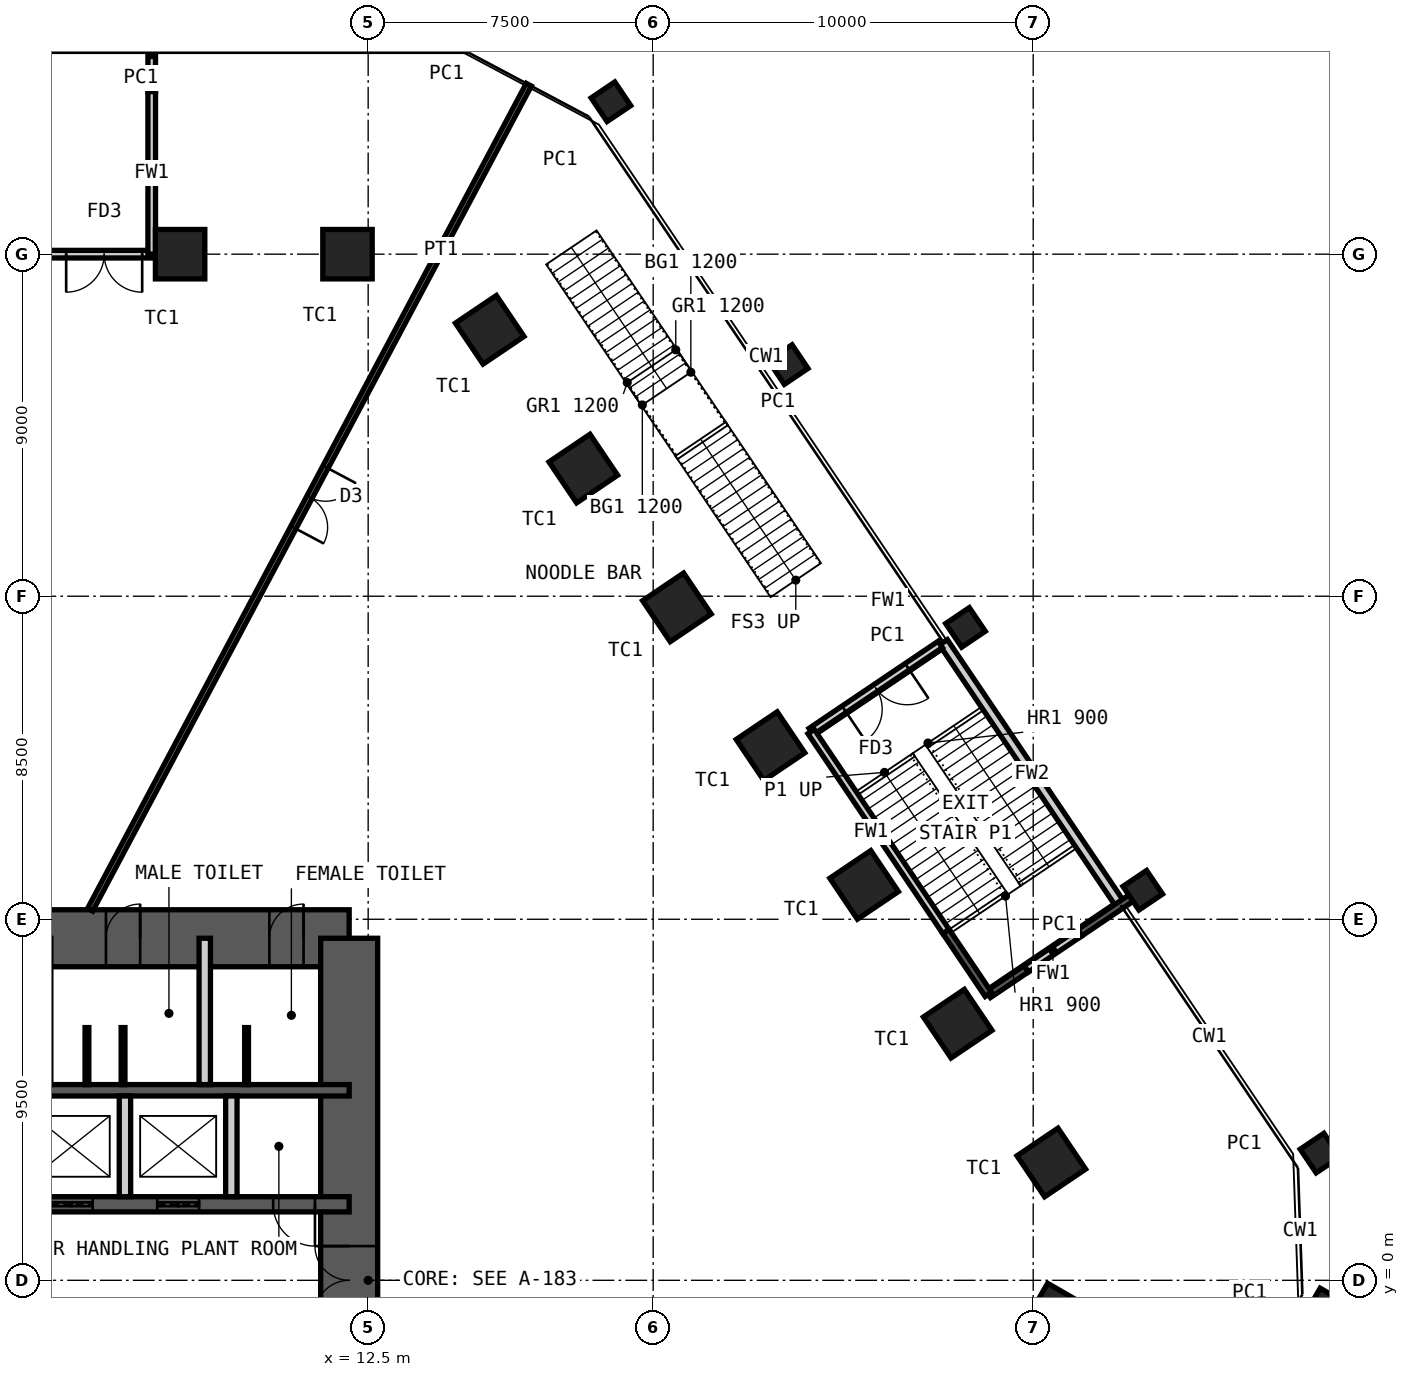
"""IFC4 building model, lengths in metres.
Left out: names, types, materials, properties, quantities, classifications, styles, units other than length and angle.
Written with IfcOpenShell. Run it as: python <this file> out.ifc"""

import sys

from ifc_helpers import new_model, si_unit, direction, frame, frame_2d, origin, origin_2d, place, context, subcontext, project, spatial, rectangle, hollow_rectangle, extrude, element, fill, save


model = new_model("IFC4")
c1 = context("Model", 3, precision=1e-05, world=origin(), true_north=direction((0.0, 1.0)))
c2 = subcontext(c1, "Body", "Model", "MODEL_VIEW")
j1 = project(units=[si_unit("LENGTHUNIT", "METRE"), si_unit("PLANEANGLEUNIT", "RADIAN")], contexts=[c1])
p1 = place(None, origin())
s1 = spatial("IfcSite", under=j1, at=p1, CompositionType="ELEMENT")
p2 = place(p1, origin())
s2 = spatial("IfcBuilding", under=s1, at=p2, CompositionType="ELEMENT")
p3 = place(p2, frame((0.0, 0.0, 6.0)))
s3 = spatial("IfcBuildingStorey", under=s2, at=p3, CompositionType="ELEMENT", Elevation=6.0)
for number, where, z_axis, x_axis in (
    (1, (7.552, 27.0, 0.0), (0.0, 0.0, 1.0), (-1.0, 0.0, 0.0)),
    (2, (11.956, 27.0, 0.0), (0.0, 0.0, 1.0), (-1.0, 0.0, 0.0)),
    (3, (15.698, 25.01, 0.0), (0.0, 0.0, 1.0), (-0.559, 0.829, 0.0)),
    (4, (18.161, 21.359, 0.0), (0.0, 0.0, 1.0), (-0.559, 0.829, 0.0)),
    (5, (20.624, 17.707, 0.0), (0.0, 0.0, 1.0), (-0.559, 0.829, 0.0)),
    (6, (23.087, 14.056, 0.0), (0.0, 0.0, 1.0), (-0.559, 0.829, 0.0)),
    (7, (25.55, 10.404, 0.0), (0.0, 0.0, 1.0), (-0.559, 0.829, 0.0)),
    (8, (28.013, 6.752, 0.0), (0.0, 0.0, 1.0), (-0.559, 0.829, 0.0)),
    (9, (30.476, 3.101, 0.0), (0.0, 0.0, 1.0), (-0.559, 0.829, 0.0)),
    (10, (30.618, -0.967, 0.0), (0.0, 0.0, 1.0), (0.5, 0.866, 0.0)),
):
    element("IfcColumn", number, at=place(p3, frame(where, z_axis=z_axis, x_axis=x_axis)), inside=s3, PredefinedType="COLUMN", context=c2, shape_type="SweptSolid", body=[
        extrude(hollow_rectangle(XDim=1.3, YDim=1.3, WallThickness=0.1, at=origin_2d()), origin(), (0.0, 0.0, 1.0), 6.0),
    ])
for number, where, z_axis, x_axis in (
    (11, (18.888, 31.01, 0.0), (0.0, 0.0, 1.0), (-0.559, 0.829, 0.0)),
    (12, (23.553, 24.095, 0.0), (0.0, 0.0, 1.0), (-0.559, 0.829, 0.0)),
    (13, (28.218, 17.179, 0.0), (0.0, 0.0, 1.0), (-0.559, 0.829, 0.0)),
    (14, (32.883, 10.263, 0.0), (0.0, 0.0, 1.0), (-0.559, 0.829, 0.0)),
    (15, (37.689, -0.72, 0.0), (0.0, 0.0, 1.0), (0.5, 0.866, 0.0)),
    (16, (37.547, 3.348, 0.0), (0.0, 0.0, 1.0), (-0.559, 0.829, 0.0)),
):
    element("IfcColumn", number, at=place(p3, frame(where, z_axis=z_axis, x_axis=x_axis)), inside=s3, PredefinedType="COLUMN", context=c2, shape_type="SweptSolid", body=[
        extrude(hollow_rectangle(XDim=0.75, YDim=0.75, WallThickness=0.036, at=origin_2d()), origin(), (0.0, 0.0, 1.0), 6.0),
    ])
p4 = place(p3, frame((-12.0, 9.0, 0.0), z_axis=(0.0, 0.0, 1.0), x_axis=(1.0, 0.0, 0.0)))
e17 = element("IfcWall", 17, at=p4, inside=s3, PredefinedType="SHEAR", context=c2, shape_type="SweptSolid", body=[
    extrude(rectangle(XDim=24.0, YDim=1.5, at=frame_2d((12.0, 0.0))), origin(), (0.0, 0.0, 1.0), 6.0),
])
p5 = place(p4, frame((10.4, 0.0, 0.0)))
e18 = element("IfcOpeningElement", 18, at=p5, cuts=e17, PredefinedType="OPENING", context=c2, shape_type="SweptSolid", body=[
    extrude(rectangle(XDim=1.0, YDim=2.1, at=frame_2d((0.5, 1.05))), frame((0.0, 0.76, 0.0), z_axis=(0.0, -1.0, 0.0), x_axis=(1.0, 0.0, 0.0)), (0.0, 0.0, 1.0), 1.52),
])
p6 = place(p4, frame((17.6, 0.0, 0.0)))
e19 = element("IfcOpeningElement", 19, at=p6, cuts=e17, PredefinedType="OPENING", context=c2, shape_type="SweptSolid", body=[
    extrude(rectangle(XDim=0.9, YDim=2.1, at=frame_2d((0.45, 1.05))), frame((0.0, 0.76, 0.0), z_axis=(0.0, -1.0, 0.0), x_axis=(1.0, 0.0, 0.0)), (0.0, 0.0, 1.0), 1.52),
])
p7 = place(p4, frame((21.9, 0.0, 0.0)))
e20 = element("IfcOpeningElement", 20, at=p7, cuts=e17, PredefinedType="OPENING", context=c2, shape_type="SweptSolid", body=[
    extrude(rectangle(XDim=0.9, YDim=2.1, at=frame_2d((0.45, 1.05))), frame((0.0, 0.76, 0.0), z_axis=(0.0, -1.0, 0.0), x_axis=(1.0, 0.0, 0.0)), (0.0, 0.0, 1.0), 1.52),
])
p8 = place(p3, frame((12.0, -9.0, 0.0), z_axis=(0.0, 0.0, 1.0), x_axis=(0.0, 1.0, 0.0)))
e21 = element("IfcWall", 21, at=p8, inside=s3, PredefinedType="SHEAR", context=c2, shape_type="SweptSolid", body=[
    extrude(rectangle(XDim=18.0, YDim=1.5, at=frame_2d((9.0, 0.0))), origin(), (0.0, 0.0, 1.0), 6.0),
])
p9 = place(p8, frame((8.1, 0.0, 0.0)))
e22 = element("IfcOpeningElement", 22, at=p9, cuts=e21, PredefinedType="OPENING", context=c2, shape_type="SweptSolid", body=[
    extrude(rectangle(XDim=1.8, YDim=2.1, at=frame_2d((0.9, 1.05))), frame((0.0, 0.76, 0.0), z_axis=(0.0, -1.0, 0.0), x_axis=(1.0, 0.0, 0.0)), (0.0, 0.0, 1.0), 1.52),
])
p10 = place(p3, frame((-12.0, 5.0, 0.0), z_axis=(0.0, 0.0, 1.0), x_axis=(1.0, 0.0, 0.0)))
e23 = element("IfcWall", 23, at=p10, inside=s3, PredefinedType="SHEAR", context=c2, shape_type="SweptSolid", body=[
    extrude(rectangle(XDim=24.0, YDim=0.3, at=frame_2d((12.0, 0.0))), origin(), (0.0, 0.0, 1.0), 6.0),
])
p11 = place(p3, frame((-12.0, 2.0, 0.0), z_axis=(0.0, 0.0, 1.0), x_axis=(1.0, 0.0, 0.0)))
e24 = element("IfcWall", 24, at=p11, inside=s3, PredefinedType="SHEAR", context=c2, shape_type="SweptSolid", body=[
    extrude(rectangle(XDim=24.0, YDim=0.4, at=frame_2d((12.0, 0.0))), origin(), (0.0, 0.0, 1.0), 6.0),
])
p12 = place(p11, frame((2.4, 0.0, 0.0)))
e25 = element("IfcOpeningElement", 25, at=p12, cuts=e24, PredefinedType="OPENING", context=c2, shape_type="SweptSolid", body=[
    extrude(rectangle(XDim=1.1, YDim=2.1, at=frame_2d((0.55, 1.05))), frame((0.0, 0.21, 0.0), z_axis=(0.0, -1.0, 0.0), x_axis=(1.0, 0.0, 0.0)), (0.0, 0.0, 1.0), 0.42),
])
p13 = place(p11, frame((22.0, 0.0, 0.0)))
e26 = element("IfcOpeningElement", 26, at=p13, cuts=e24, PredefinedType="OPENING", context=c2, shape_type="SweptSolid", body=[
    extrude(rectangle(XDim=1.1, YDim=2.1, at=frame_2d((0.55, 1.05))), frame((0.0, 0.21, 0.0), z_axis=(0.0, -1.0, 0.0), x_axis=(1.0, 0.0, 0.0)), (0.0, 0.0, 1.0), 0.42),
])
p14 = place(p11, frame((10.15, 0.0, 0.0)))
e27 = element("IfcOpeningElement", 27, at=p14, cuts=e24, PredefinedType="OPENING", context=c2, shape_type="SweptSolid", body=[
    extrude(rectangle(XDim=1.0, YDim=2.1, at=frame_2d((0.5, 1.05))), frame((0.0, 0.21, 0.0), z_axis=(0.0, -1.0, 0.0), x_axis=(1.0, 0.0, 0.0)), (0.0, 0.0, 1.0), 0.42),
])
p15 = place(p11, frame((6.7, 0.0, 0.0)))
e28 = element("IfcOpeningElement", 28, at=p15, cuts=e24, PredefinedType="OPENING", context=c2, shape_type="SweptSolid", body=[
    extrude(rectangle(XDim=1.4, YDim=2.4, at=frame_2d((0.7, 1.2))), frame((0.0, 0.21, 0.0), z_axis=(0.0, -1.0, 0.0), x_axis=(1.0, 0.0, 0.0)), (0.0, 0.0, 1.0), 0.42),
])
p16 = place(p11, frame((13.35, 0.0, 0.0)))
e29 = element("IfcOpeningElement", 29, at=p16, cuts=e24, PredefinedType="OPENING", context=c2, shape_type="SweptSolid", body=[
    extrude(rectangle(XDim=1.1, YDim=2.4, at=frame_2d((0.55, 1.2))), frame((0.0, 0.21, 0.0), z_axis=(0.0, -1.0, 0.0), x_axis=(1.0, 0.0, 0.0)), (0.0, 0.0, 1.0), 0.42),
])
p17 = place(p11, frame((16.15, 0.0, 0.0)))
e30 = element("IfcOpeningElement", 30, at=p17, cuts=e24, PredefinedType="OPENING", context=c2, shape_type="SweptSolid", body=[
    extrude(rectangle(XDim=1.1, YDim=2.4, at=frame_2d((0.55, 1.2))), frame((0.0, 0.21, 0.0), z_axis=(0.0, -1.0, 0.0), x_axis=(1.0, 0.0, 0.0)), (0.0, 0.0, 1.0), 0.42),
])
p18 = place(p11, frame((18.95, 0.0, 0.0)))
e31 = element("IfcOpeningElement", 31, at=p18, cuts=e24, PredefinedType="OPENING", context=c2, shape_type="SweptSolid", body=[
    extrude(rectangle(XDim=1.1, YDim=2.4, at=frame_2d((0.55, 1.2))), frame((0.0, 0.21, 0.0), z_axis=(0.0, -1.0, 0.0), x_axis=(1.0, 0.0, 0.0)), (0.0, 0.0, 1.0), 0.42),
])
p19 = place(p3, frame((8.2, 5.15, 0.0), z_axis=(0.0, 0.0, 1.0), x_axis=(0.0, 1.0, 0.0)))
e32 = element("IfcWall", 32, at=p19, inside=s3, PredefinedType="PARTITIONING", context=c2, shape_type="SweptSolid", body=[
    extrude(rectangle(XDim=3.85, YDim=0.3, at=frame_2d((1.925, 0.0))), origin(), (0.0, 0.0, 1.0), 5.78),
])
for number, where, z_axis, x_axis in (
    (33, (6.1, 2.2, 0.0), (0.0, 0.0, 1.0), (0.0, 1.0, 0.0)),
    (34, (8.9, 2.2, 0.0), (0.0, 0.0, 1.0), (0.0, 1.0, 0.0)),
):
    element("IfcWall", number, at=place(p3, frame(where, z_axis=z_axis, x_axis=x_axis)), inside=s3, PredefinedType="PARTITIONING", context=c2, shape_type="SweptSolid", body=[
        extrude(rectangle(XDim=2.65, YDim=0.3, at=frame_2d((1.325, 0.0))), origin(), (0.0, 0.0, 1.0), 5.78),
    ])
p20 = place(p3, frame((27.637, 16.788, 0.0), z_axis=(0.0, 0.0, 1.0), x_axis=(0.559196871021, -0.829034896395, 0.0)))
e35 = element("IfcWall", 35, at=p20, inside=s3, PredefinedType="SOLIDWALL", context=c2, shape_type="SweptSolid", body=[
    extrude(rectangle(XDim=8.342, YDim=0.25, at=frame_2d((4.171, 0.0))), origin(), (0.0, 0.0, 1.0), 5.75),
])
for number, where, z_axis, x_axis in (
    (36, (5.1, 5.15, 0.0), (0.0, 0.0, 1.0), (0.0, 1.0, 0.0)),
    (37, (6.05, 5.15, 0.0), (0.0, 0.0, 1.0), (0.0, 1.0, 0.0)),
    (38, (9.3, 5.15, 0.0), (0.0, 0.0, 1.0), (0.0, 1.0, 0.0)),
):
    element("IfcWall", number, at=place(p3, frame(where, z_axis=z_axis, x_axis=x_axis)), inside=s3, PredefinedType="PARTITIONING", context=c2, shape_type="SweptSolid", body=[
        extrude(rectangle(XDim=1.5, YDim=0.1, at=frame_2d((0.75, 0.0))), origin(), (0.0, 0.0, 1.0), 2.1),
    ])
p21 = place(p3, frame((6.805, 32.2, 0.0), z_axis=(0.0, 0.0, 1.0), x_axis=(0.0, -1.0, 0.0)))
e39 = element("IfcWall", 39, at=p21, inside=s3, PredefinedType="PARTITIONING", context=c2, shape_type="SweptSolid", body=[
    extrude(rectangle(XDim=0.923, YDim=0.2, at=frame_2d((0.461, 0.0))), origin(), (0.0, 0.0, 1.0), 4.65),
])
p22 = place(p3, frame((-1.537, 27.0, 0.0), z_axis=(0.0, 0.0, 1.0), x_axis=(1.0, 0.0, 0.0)))
e40 = element("IfcWall", 40, at=p22, inside=s3, PredefinedType="PARTITIONING", context=c2, shape_type="SweptSolid", body=[
    extrude(rectangle(XDim=8.342, YDim=0.2, at=frame_2d((4.171, 0.0))), origin(), (0.0, 0.0, 1.0), 4.55),
])
p23 = place(p22, frame((6.091, 0.0, 0.0)))
e41 = element("IfcOpeningElement", 41, at=p23, cuts=e40, PredefinedType="OPENING", context=c2, shape_type="SweptSolid", body=[
    extrude(rectangle(XDim=2.0, YDim=2.4, at=frame_2d((1.0, 1.2))), frame((0.0, 0.11, 0.0), z_axis=(0.0, -1.0, 0.0), x_axis=(1.0, 0.0, 0.0)), (0.0, 0.0, 1.0), 0.22),
])
p24 = place(p3, frame((5.184, 9.75, 0.0), z_axis=(0.0, 0.0, 1.0), x_axis=(0.469474147629, 0.882946218469, 0.0)))
e42 = element("IfcWall", 42, at=p24, inside=s3, PredefinedType="PARTITIONING", context=c2, shape_type="SweptSolid", body=[
    extrude(rectangle(XDim=24.588, YDim=0.15, at=frame_2d((12.294, 0.0))), origin(), (0.0, 0.0, 1.0), 5.75),
])
p25 = place(p24, frame((11.394, 0.0, 0.0)))
e43 = element("IfcOpeningElement", 43, at=p25, cuts=e42, PredefinedType="OPENING", context=c2, shape_type="SweptSolid", body=[
    extrude(rectangle(XDim=1.8, YDim=2.4, at=frame_2d((0.9, 1.2))), frame((0.0, 0.085, 0.0), z_axis=(0.0, -1.0, 0.0), x_axis=(1.0, 0.0, 0.0)), (0.0, 0.0, 1.0), 0.17),
])
p26 = place(p3, frame((27.555, 16.732, 0.0), z_axis=(0.0, 0.0, 1.0), x_axis=(-0.829042598749, -0.55918545176, 0.0)))
e44 = element("IfcWall", 44, at=p26, inside=s3, PredefinedType="PARTITIONING", context=c2, shape_type="SweptSolid", body=[
    extrude(rectangle(XDim=4.1, YDim=0.2, at=frame_2d((2.05, 0.0))), origin(), (0.0, 0.0, 1.0), 5.75),
])
p27 = place(p26, frame((1.05, 0.0, 0.0)))
e45 = element("IfcOpeningElement", 45, at=p27, cuts=e44, PredefinedType="OPENING", context=c2, shape_type="SweptSolid", body=[
    extrude(rectangle(XDim=2.0, YDim=2.4, at=frame_2d((1.0, 1.2))), frame((0.0, 0.11, 0.0), z_axis=(0.0, -1.0, 0.0), x_axis=(1.0, 0.0, 0.0)), (0.0, 0.0, 1.0), 0.22),
])
p28 = place(p3, frame((32.572, 10.054, 0.0), z_axis=(0.0, 0.0, 1.0), x_axis=(-0.829033253898, -0.55919930609, 0.0)))
e46 = element("IfcWall", 46, at=p28, inside=s3, PredefinedType="PARTITIONING", context=c2, shape_type="SweptSolid", body=[
    extrude(rectangle(XDim=1.625, YDim=0.2, at=frame_2d((0.812, 0.0))), origin(), (0.0, 0.0, 1.0), 5.75),
])
p29 = place(p3, frame((24.156, 14.439, 0.0), z_axis=(0.0, 0.0, 1.0), x_axis=(0.559181615952, -0.829045185971, 0.0)))
e47 = element("IfcWall", 47, at=p29, inside=s3, PredefinedType="PARTITIONING", context=c2, shape_type="SweptSolid", body=[
    extrude(rectangle(XDim=6.35, YDim=0.2, at=frame_2d((3.175, 0.0))), origin(), (0.0, 0.0, 1.0), 5.75),
])
p30 = place(p3, frame((31.224, 9.145, 0.0), z_axis=(0.0, 0.0, 1.0), x_axis=(-0.829033422808, -0.559199055675, 0.0)))
e48 = element("IfcWall", 48, at=p30, inside=s3, PredefinedType="PARTITIONING", context=c2, shape_type="SweptSolid", body=[
    extrude(rectangle(XDim=1.7, YDim=0.2, at=frame_2d((0.85, 0.0))), origin(), (0.0, 0.0, 1.0), 5.75),
])
p31 = place(p3, frame((29.815, 8.194, 0.0), z_axis=(0.0, 0.0, 1.0), x_axis=(-0.829096255744, -0.559105892217, 0.0)))
e49 = element("IfcWall", 49, at=p31, inside=s3, PredefinedType="PARTITIONING", context=c2, shape_type="SweptSolid", body=[
    extrude(rectangle(XDim=1.2, YDim=0.2, at=frame_2d((0.6, 0.0))), origin(), (0.0, 0.0, 1.0), 5.75),
])
p32 = place(p3, frame((27.706, 9.175, 0.0), z_axis=(0.0, 0.0, 1.0), x_axis=(0.559218085846, -0.829020586272, 0.0)))
e50 = element("IfcWall", 50, at=p32, inside=s3, PredefinedType="PARTITIONING", context=c2, shape_type="SweptSolid", body=[
    extrude(rectangle(XDim=1.992, YDim=0.2, at=frame_2d((0.996, 0.0))), origin(), (0.0, 0.0, 1.0), 5.75),
])
p33 = place(p3, frame((6.805, 31.277, 0.0), z_axis=(0.0, 0.0, 1.0), x_axis=(0.0, -1.0, 0.0)))
e51 = element("IfcWall", 51, at=p33, inside=s3, PredefinedType="PARTITIONING", context=c2, shape_type="SweptSolid", body=[
    extrude(rectangle(XDim=4.277, YDim=0.2, at=frame_2d((2.139, 0.0))), origin(), (0.0, 0.0, 1.0), 5.75),
])
p34 = place(p6, origin())
e52 = element("IfcDoor", 52, at=p34, inside=s3, OperationType="SINGLE_SWING_LEFT", PredefinedType="DOOR", context=c2, shape_type="SweptSolid", body=[
    extrude(rectangle(XDim=0.9, YDim=2.1, at=frame_2d((0.45, 1.05))), frame((0.0, 0.025, 0.0), z_axis=(0.0, -1.0, 0.0), x_axis=(1.0, 0.0, 0.0)), (0.0, 0.0, 1.0), 0.05),
])
fill(e19, e52)
p35 = place(p7, origin())
e53 = element("IfcDoor", 53, at=p35, inside=s3, OperationType="SINGLE_SWING_LEFT", PredefinedType="DOOR", context=c2, shape_type="SweptSolid", body=[
    extrude(rectangle(XDim=0.9, YDim=2.1, at=frame_2d((0.45, 1.05))), frame((0.0, 0.025, 0.0), z_axis=(0.0, -1.0, 0.0), x_axis=(1.0, 0.0, 0.0)), (0.0, 0.0, 1.0), 0.05),
])
fill(e20, e53)
p36 = place(p13, origin())
e54 = element("IfcDoor", 54, at=p36, inside=s3, OperationType="SINGLE_SWING_RIGHT", PredefinedType="DOOR", context=c2, shape_type="SweptSolid", body=[
    extrude(rectangle(XDim=1.1, YDim=2.1, at=frame_2d((0.55, 1.05))), frame((0.0, 0.025, 0.0), z_axis=(0.0, -1.0, 0.0), x_axis=(1.0, 0.0, 0.0)), (0.0, 0.0, 1.0), 0.05),
])
fill(e26, e54)
p37 = place(p9, origin())
e55 = element("IfcDoor", 55, at=p37, inside=s3, OperationType="DOUBLE_DOOR_DOUBLE_SWING", PredefinedType="DOOR", context=c2, shape_type="SweptSolid", body=[
    extrude(rectangle(XDim=1.8, YDim=2.1, at=frame_2d((0.9, 1.05))), frame((0.0, 0.025, 0.0), z_axis=(0.0, -1.0, 0.0), x_axis=(1.0, 0.0, 0.0)), (0.0, 0.0, 1.0), 0.05),
])
fill(e22, e55)
p38 = place(p17, origin())
e56 = element("IfcDoor", 56, at=p38, inside=s3, OperationType="DOUBLE_DOOR_SLIDING", PredefinedType="DOOR", context=c2, shape_type="SweptSolid", body=[
    extrude(rectangle(XDim=1.1, YDim=2.4, at=frame_2d((0.55, 1.2))), frame((0.0, 0.025, 0.0), z_axis=(0.0, -1.0, 0.0), x_axis=(1.0, 0.0, 0.0)), (0.0, 0.0, 1.0), 0.05),
])
fill(e30, e56)
p39 = place(p18, origin())
e57 = element("IfcDoor", 57, at=p39, inside=s3, OperationType="DOUBLE_DOOR_SLIDING", PredefinedType="DOOR", context=c2, shape_type="SweptSolid", body=[
    extrude(rectangle(XDim=1.1, YDim=2.4, at=frame_2d((0.55, 1.2))), frame((0.0, 0.025, 0.0), z_axis=(0.0, -1.0, 0.0), x_axis=(1.0, 0.0, 0.0)), (0.0, 0.0, 1.0), 0.05),
])
fill(e31, e57)
p40 = place(p23, origin())
e58 = element("IfcDoor", 58, at=p40, inside=s3, OperationType="DOUBLE_DOOR_DOUBLE_SWING", PredefinedType="DOOR", context=c2, shape_type="SweptSolid", body=[
    extrude(rectangle(XDim=2.0, YDim=2.4, at=frame_2d((1.0, 1.2))), frame((0.0, 0.025, 0.0), z_axis=(0.0, -1.0, 0.0), x_axis=(1.0, 0.0, 0.0)), (0.0, 0.0, 1.0), 0.05),
])
fill(e41, e58)
p41 = place(p25, origin())
e59 = element("IfcDoor", 59, at=p41, inside=s3, OperationType="DOUBLE_DOOR_DOUBLE_SWING", PredefinedType="DOOR", context=c2, shape_type="SweptSolid", body=[
    extrude(rectangle(XDim=1.8, YDim=2.4, at=frame_2d((0.9, 1.2))), frame((0.0, 0.025, 0.0), z_axis=(0.0, -1.0, 0.0), x_axis=(1.0, 0.0, 0.0)), (0.0, 0.0, 1.0), 0.05),
])
fill(e43, e59)
p42 = place(p27, origin())
e60 = element("IfcDoor", 60, at=p42, inside=s3, OperationType="DOUBLE_DOOR_DOUBLE_SWING", PredefinedType="DOOR", context=c2, shape_type="SweptSolid", body=[
    extrude(rectangle(XDim=2.0, YDim=2.4, at=frame_2d((1.0, 1.2))), frame((0.0, 0.025, 0.0), z_axis=(0.0, -1.0, 0.0), x_axis=(1.0, 0.0, 0.0)), (0.0, 0.0, 1.0), 0.05),
])
fill(e45, e60)
save(model, sys.argv[1])
